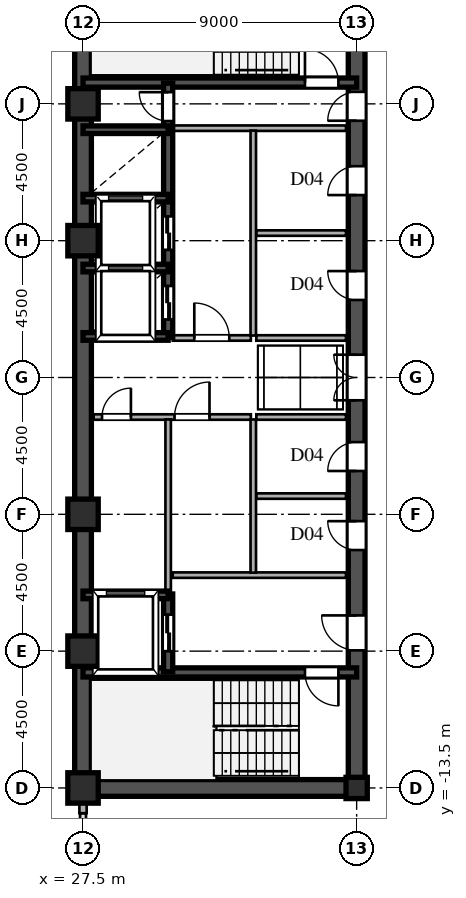
"""IFC4 building model, lengths in metres.
Left out: names, types, materials, properties, quantities, classifications, styles, units other than length and angle.
Written with IfcOpenShell. Run it as: python <this file> out.ifc"""

import sys

from ifc_helpers import new_model, si_unit, direction, frame, frame_2d, origin, origin_2d, place, context, subcontext, project, spatial, rectangle, hollow_rectangle, i_section, extrude, source, transform, mapped, element, fill, save


model = new_model("IFC4")
c1 = context("Model", 3, precision=1e-05, world=origin(), true_north=direction((0.0, 1.0)))
c2 = subcontext(c1, "Body", "Model", "MODEL_VIEW")
j1 = project(units=[si_unit("LENGTHUNIT", "METRE"), si_unit("PLANEANGLEUNIT", "RADIAN")], contexts=[c1])
p1 = place(None, origin())
s1 = spatial("IfcSite", under=j1, at=p1, CompositionType="ELEMENT")
p2 = place(p1, origin())
s2 = spatial("IfcBuilding", under=s1, at=p2, CompositionType="ELEMENT")
p3 = place(p2, frame((0.0, 0.0, 147.6)))
s3 = spatial("IfcBuildingStorey", under=s2, at=p3, CompositionType="ELEMENT", Elevation=147.6)
m1 = source(origin(), c2, "Body", "SweptSolid", [
    extrude(hollow_rectangle(XDim=1.0, YDim=1.0, WallThickness=0.042, at=origin_2d()), origin(), (0.0, 0.0, 1.0), 3.6),
])
for number, where, z_axis, x_axis in (
    (1, (27.5, -13.5, 0.0), (0.0, 0.0, 1.0), (1.0, 0.0, 0.0)),
    (2, (27.5, -9.0, 0.0), (0.0, 0.0, 1.0), (1.0, 0.0, 0.0)),
    (3, (27.5, -4.5, 0.0), (0.0, 0.0, 1.0), (1.0, 0.0, 0.0)),
    (4, (27.5, 4.5, 0.0), (0.0, 0.0, 1.0), (1.0, 0.0, 0.0)),
    (5, (27.5, 9.0, 0.0), (0.0, 0.0, 1.0), (1.0, 0.0, 0.0)),
):
    element("IfcColumn", number, at=place(p3, frame(where, z_axis=z_axis, x_axis=x_axis)), inside=s3, PredefinedType="COLUMN", context=c2, shape_type="MappedRepresentation", body=[
        mapped(m1, transform((0.0, 0.0, 0.0), scale=1.0)),
    ])
m2 = source(origin(), c2, "Body", "SweptSolid", [
    extrude(i_section(OverallWidth=0.7, OverallDepth=0.7, WebThickness=0.028, FlangeThickness=0.045, at=origin_2d()), origin(), (0.0, 0.0, 1.0), 3.6),
])
p4 = place(p3, frame((36.5, -13.5, 0.0), z_axis=(0.0, 0.0, 1.0), x_axis=(1.0, 0.0, 0.0)))
e6 = element("IfcColumn", 6, at=p4, inside=s3, PredefinedType="COLUMN", context=c2, shape_type="MappedRepresentation", body=[
    mapped(m2, transform((0.0, 0.0, 0.0), scale=1.0)),
])
p5 = place(p3, frame((27.5, -14.33, 0.0), z_axis=(0.0, 0.0, 1.0), x_axis=(0.0, 1.0, 0.0)))
e7 = element("IfcWall", 7, at=p5, inside=s3, PredefinedType="SOLIDWALL", context=c2, shape_type="SweptSolid", body=[
    extrude(rectangle(XDim=0.55, YDim=0.24, at=frame_2d((0.275, 0.0))), origin(), (0.0, 0.0, 1.0), 2.88),
])
for number, where, z_axis, x_axis in (
    (8, (27.5, -13.5, 0.0), (0.0, 0.0, 1.0), (0.0, 1.0, 0.0)),
    (9, (27.5, 1.3, 0.0), (0.0, 0.0, 1.0), (0.0, 1.0, 0.0)),
):
    element("IfcWall", number, at=place(p3, frame(where, z_axis=z_axis, x_axis=x_axis)), inside=s3, PredefinedType="SHEAR", context=c2, shape_type="SweptSolid", body=[
        extrude(rectangle(XDim=12.2, YDim=0.55, at=frame_2d((6.1, 0.0))), origin(), (0.0, 0.0, 1.0), 3.38),
    ])
p6 = place(p3, frame((27.5, -1.3, 0.0), z_axis=(0.0, 0.0, 1.0), x_axis=(0.0, 1.0, 0.0)))
e10 = element("IfcWall", 10, at=p6, inside=s3, PredefinedType="SHEAR", context=c2, shape_type="SweptSolid", body=[
    extrude(rectangle(XDim=2.6, YDim=0.55, at=frame_2d((1.3, 0.0))), origin(), (0.0, 0.0, 1.0), 3.38),
])
p7 = place(p3, frame((27.5, -13.5, 0.0), z_axis=(0.0, 0.0, 1.0), x_axis=(1.0, 0.0, 0.0)))
e11 = element("IfcWall", 11, at=p7, inside=s3, PredefinedType="SHEAR", context=c2, shape_type="SweptSolid", body=[
    extrude(rectangle(XDim=9.0, YDim=0.55, at=frame_2d((4.5, 0.0))), origin(), (0.0, 0.0, 1.0), 3.38),
])
p8 = place(p3, frame((36.5, -13.65, 0.0), z_axis=(0.0, 0.0, 1.0), x_axis=(0.0, 1.0, 0.0)))
e12 = element("IfcWall", 12, at=p8, inside=s3, PredefinedType="SHEAR", context=c2, shape_type="SweptSolid", body=[
    extrude(rectangle(XDim=7.15, YDim=0.55, at=frame_2d((3.575, 0.0))), origin(), (0.0, 0.0, 1.0), 3.38),
])
p9 = place(p8, frame((4.675, 0.0, 0.0)))
e13 = element("IfcOpeningElement", 13, at=p9, cuts=e12, PredefinedType="OPENING", context=c2, shape_type="SweptSolid", body=[
    extrude(rectangle(XDim=1.15, YDim=2.2, at=frame_2d((0.575, 1.1))), frame((0.0, 0.285, 0.0), z_axis=(0.0, -1.0, 0.0), x_axis=(1.0, 0.0, 0.0)), (0.0, 0.0, 1.0), 0.57),
])
p10 = place(p3, frame((36.5, -1.3, 0.0), z_axis=(0.0, 0.0, 1.0), x_axis=(0.0, 1.0, 0.0)))
e14 = element("IfcWall", 14, at=p10, inside=s3, PredefinedType="SHEAR", context=c2, shape_type="SweptSolid", body=[
    extrude(rectangle(XDim=2.6, YDim=0.55, at=frame_2d((1.3, 0.0))), origin(), (0.0, 0.0, 1.0), 3.38),
])
p11 = place(p10, frame((0.55, 0.0, 0.0)))
e15 = element("IfcOpeningElement", 15, at=p11, cuts=e14, PredefinedType="OPENING", context=c2, shape_type="SweptSolid", body=[
    extrude(rectangle(XDim=1.5, YDim=2.3, at=frame_2d((0.75, 1.15))), frame((0.0, 0.285, 0.0), z_axis=(0.0, -1.0, 0.0), x_axis=(1.0, 0.0, 0.0)), (0.0, 0.0, 1.0), 0.57),
])
p12 = place(p3, frame((36.5, 8.2, 0.0), z_axis=(0.0, 0.0, 1.0), x_axis=(0.0, 1.0, 0.0)))
e16 = element("IfcWall", 16, at=p12, inside=s3, PredefinedType="SHEAR", context=c2, shape_type="SweptSolid", body=[
    extrude(rectangle(XDim=5.45, YDim=0.55, at=frame_2d((2.725, 0.0))), origin(), (0.0, 0.0, 1.0), 3.38),
])
p13 = place(p12, frame((0.245, 0.0, 0.0)))
e17 = element("IfcOpeningElement", 17, at=p13, cuts=e16, PredefinedType="OPENING", context=c2, shape_type="SweptSolid", body=[
    extrude(rectangle(XDim=0.95, YDim=2.15, at=frame_2d((0.475, 1.075))), frame((0.0, 0.285, 0.0), z_axis=(0.0, -1.0, 0.0), x_axis=(1.0, 0.0, 0.0)), (0.0, 0.0, 1.0), 0.57),
])
p14 = place(p3, frame((36.5, -6.5, 0.0), z_axis=(0.0, 0.0, 1.0), x_axis=(0.0, 1.0, 0.0)))
e18 = element("IfcWall", 18, at=p14, inside=s3, PredefinedType="SHEAR", context=c2, shape_type="SweptSolid", body=[
    extrude(rectangle(XDim=2.6, YDim=0.55, at=frame_2d((1.3, 0.0))), origin(), (0.0, 0.0, 1.0), 3.38),
])
p15 = place(p14, frame((0.825, 0.0, 0.0)))
e19 = element("IfcOpeningElement", 19, at=p15, cuts=e18, PredefinedType="OPENING", context=c2, shape_type="SweptSolid", body=[
    extrude(rectangle(XDim=0.95, YDim=2.15, at=frame_2d((0.475, 1.075))), frame((0.0, 0.285, 0.0), z_axis=(0.0, -1.0, 0.0), x_axis=(1.0, 0.0, 0.0)), (0.0, 0.0, 1.0), 0.57),
])
p16 = place(p3, frame((36.5, -3.9, 0.0), z_axis=(0.0, 0.0, 1.0), x_axis=(0.0, 1.0, 0.0)))
e20 = element("IfcWall", 20, at=p16, inside=s3, PredefinedType="SHEAR", context=c2, shape_type="SweptSolid", body=[
    extrude(rectangle(XDim=2.6, YDim=0.55, at=frame_2d((1.3, 0.0))), origin(), (0.0, 0.0, 1.0), 3.38),
])
p17 = place(p16, frame((0.825, 0.0, 0.0)))
e21 = element("IfcOpeningElement", 21, at=p17, cuts=e20, PredefinedType="OPENING", context=c2, shape_type="SweptSolid", body=[
    extrude(rectangle(XDim=0.95, YDim=2.15, at=frame_2d((0.475, 1.075))), frame((0.0, 0.285, 0.0), z_axis=(0.0, -1.0, 0.0), x_axis=(1.0, 0.0, 0.0)), (0.0, 0.0, 1.0), 0.57),
])
p18 = place(p3, frame((36.5, 1.3, 0.0), z_axis=(0.0, 0.0, 1.0), x_axis=(0.0, 1.0, 0.0)))
e22 = element("IfcWall", 22, at=p18, inside=s3, PredefinedType="SHEAR", context=c2, shape_type="SweptSolid", body=[
    extrude(rectangle(XDim=3.45, YDim=0.55, at=frame_2d((1.725, 0.0))), origin(), (0.0, 0.0, 1.0), 3.38),
])
p19 = place(p18, frame((1.25, 0.0, 0.0)))
e23 = element("IfcOpeningElement", 23, at=p19, cuts=e22, PredefinedType="OPENING", context=c2, shape_type="SweptSolid", body=[
    extrude(rectangle(XDim=0.95, YDim=2.15, at=frame_2d((0.475, 1.075))), frame((0.0, 0.285, 0.0), z_axis=(0.0, -1.0, 0.0), x_axis=(1.0, 0.0, 0.0)), (0.0, 0.0, 1.0), 0.57),
])
p20 = place(p3, frame((36.5, 4.75, 0.0), z_axis=(0.0, 0.0, 1.0), x_axis=(0.0, 1.0, 0.0)))
e24 = element("IfcWall", 24, at=p20, inside=s3, PredefinedType="SHEAR", context=c2, shape_type="SweptSolid", body=[
    extrude(rectangle(XDim=3.45, YDim=0.55, at=frame_2d((1.725, 0.0))), origin(), (0.0, 0.0, 1.0), 3.38),
])
p21 = place(p20, frame((1.25, 0.0, 0.0)))
e25 = element("IfcOpeningElement", 25, at=p21, cuts=e24, PredefinedType="OPENING", context=c2, shape_type="SweptSolid", body=[
    extrude(rectangle(XDim=0.95, YDim=2.15, at=frame_2d((0.475, 1.075))), frame((0.0, 0.285, 0.0), z_axis=(0.0, -1.0, 0.0), x_axis=(1.0, 0.0, 0.0)), (0.0, 0.0, 1.0), 0.57),
])
p22 = place(p3, frame((27.5, -9.7, 0.0), z_axis=(0.0, 0.0, 1.0), x_axis=(1.0, 0.0, 0.0)))
e26 = element("IfcWall", 26, at=p22, inside=s3, PredefinedType="SHEAR", context=c2, shape_type="SweptSolid", body=[
    extrude(rectangle(XDim=9.0, YDim=0.3, at=frame_2d((4.5, 0.0))), origin(), (0.0, 0.0, 1.0), 3.38),
])
p23 = place(p22, frame((7.3, 0.0, 0.0)))
e27 = element("IfcOpeningElement", 27, at=p23, cuts=e26, PredefinedType="OPENING", context=c2, shape_type="SweptSolid", body=[
    extrude(rectangle(XDim=1.1, YDim=2.2, at=frame_2d((0.55, 1.1))), frame((0.0, 0.16, 0.0), z_axis=(0.0, -1.0, 0.0), x_axis=(1.0, 0.0, 0.0)), (0.0, 0.0, 1.0), 0.32),
])
p24 = place(p3, frame((27.5, 9.7, 0.0), z_axis=(0.0, 0.0, 1.0), x_axis=(1.0, 0.0, 0.0)))
e28 = element("IfcWall", 28, at=p24, inside=s3, PredefinedType="SHEAR", context=c2, shape_type="SweptSolid", body=[
    extrude(rectangle(XDim=9.0, YDim=0.3, at=frame_2d((4.5, 0.0))), origin(), (0.0, 0.0, 1.0), 3.38),
])
p25 = place(p24, frame((7.3, 0.0, 0.0)))
e29 = element("IfcOpeningElement", 29, at=p25, cuts=e28, PredefinedType="OPENING", context=c2, shape_type="SweptSolid", body=[
    extrude(rectangle(XDim=1.1, YDim=2.2, at=frame_2d((0.55, 1.1))), frame((0.0, 0.16, 0.0), z_axis=(0.0, -1.0, 0.0), x_axis=(1.0, 0.0, 0.0)), (0.0, 0.0, 1.0), 0.32),
])
for number, where, z_axis, x_axis in (
    (30, (27.5, -7.15, 0.0), (0.0, 0.0, 1.0), (1.0, 0.0, 0.0)),
    (31, (27.5, 1.35, 0.0), (0.0, 0.0, 1.0), (1.0, 0.0, 0.0)),
    (32, (27.5, 3.6, 0.0), (0.0, 0.0, 1.0), (1.0, 0.0, 0.0)),
    (33, (27.5, 5.9, 0.0), (0.0, 0.0, 1.0), (1.0, 0.0, 0.0)),
    (34, (27.5, 8.15, 0.0), (0.0, 0.0, 1.0), (1.0, 0.0, 0.0)),
):
    element("IfcWall", number, at=place(p3, frame(where, z_axis=z_axis, x_axis=x_axis)), inside=s3, PredefinedType="SHEAR", context=c2, shape_type="SweptSolid", body=[
        extrude(rectangle(XDim=2.8, YDim=0.25, at=frame_2d((1.4, 0.0))), origin(), (0.0, 0.0, 1.0), 3.38),
    ])
p26 = place(p3, frame((30.3, -9.68, 0.0), z_axis=(0.0, 0.0, 1.0), x_axis=(0.0, 1.0, 0.0)))
e35 = element("IfcWall", 35, at=p26, inside=s3, PredefinedType="SHEAR", context=c2, shape_type="SweptSolid", body=[
    extrude(rectangle(XDim=2.56, YDim=0.3, at=frame_2d((1.28, 0.0))), origin(), (0.0, 0.0, 1.0), 3.38),
])
p27 = place(p26, frame((0.68, 0.0, 0.0)))
e36 = element("IfcOpeningElement", 36, at=p27, cuts=e35, PredefinedType="OPENING", context=c2, shape_type="SweptSolid", body=[
    extrude(rectangle(XDim=1.2, YDim=2.25, at=frame_2d((0.6, 1.125))), frame((0.0, 0.16, 0.0), z_axis=(0.0, -1.0, 0.0), x_axis=(1.0, 0.0, 0.0)), (0.0, 0.0, 1.0), 0.32),
])
p28 = place(p3, frame((30.3, 1.32, 0.0), z_axis=(0.0, 0.0, 1.0), x_axis=(0.0, 1.0, 0.0)))
e37 = element("IfcWall", 37, at=p28, inside=s3, PredefinedType="SHEAR", context=c2, shape_type="SweptSolid", body=[
    extrude(rectangle(XDim=2.28, YDim=0.3, at=frame_2d((1.14, 0.0))), origin(), (0.0, 0.0, 1.0), 3.38),
])
p29 = place(p28, frame((0.59, 0.0, 0.0)))
e38 = element("IfcOpeningElement", 38, at=p29, cuts=e37, PredefinedType="OPENING", context=c2, shape_type="SweptSolid", body=[
    extrude(rectangle(XDim=1.1, YDim=2.2, at=frame_2d((0.55, 1.1))), frame((0.0, 0.16, 0.0), z_axis=(0.0, -1.0, 0.0), x_axis=(1.0, 0.0, 0.0)), (0.0, 0.0, 1.0), 0.32),
])
p30 = place(p3, frame((30.3, 3.6, 0.0), z_axis=(0.0, 0.0, 1.0), x_axis=(0.0, 1.0, 0.0)))
e39 = element("IfcWall", 39, at=p30, inside=s3, PredefinedType="SHEAR", context=c2, shape_type="SweptSolid", body=[
    extrude(rectangle(XDim=2.3, YDim=0.3, at=frame_2d((1.15, 0.0))), origin(), (0.0, 0.0, 1.0), 3.38),
])
p31 = place(p30, frame((0.6, 0.0, 0.0)))
e40 = element("IfcOpeningElement", 40, at=p31, cuts=e39, PredefinedType="OPENING", context=c2, shape_type="SweptSolid", body=[
    extrude(rectangle(XDim=1.1, YDim=2.2, at=frame_2d((0.55, 1.1))), frame((0.0, 0.16, 0.0), z_axis=(0.0, -1.0, 0.0), x_axis=(1.0, 0.0, 0.0)), (0.0, 0.0, 1.0), 0.32),
])
p32 = place(p3, frame((30.3, 5.9, 0.0), z_axis=(0.0, 0.0, 1.0), x_axis=(0.0, 1.0, 0.0)))
e41 = element("IfcWall", 41, at=p32, inside=s3, PredefinedType="SHEAR", context=c2, shape_type="SweptSolid", body=[
    extrude(rectangle(XDim=2.25, YDim=0.3, at=frame_2d((1.125, 0.0))), origin(), (0.0, 0.0, 1.0), 3.38),
])
p33 = place(p3, frame((30.3, 8.15, 0.0), z_axis=(0.0, 0.0, 1.0), x_axis=(0.0, 1.0, 0.0)))
e42 = element("IfcWall", 42, at=p33, inside=s3, PredefinedType="SHEAR", context=c2, shape_type="SweptSolid", body=[
    extrude(rectangle(XDim=1.53, YDim=0.3, at=frame_2d((0.765, 0.0))), origin(), (0.0, 0.0, 1.0), 3.38),
])
p34 = place(p33, frame((0.285, 0.0, 0.0)))
e43 = element("IfcOpeningElement", 43, at=p34, cuts=e42, PredefinedType="OPENING", context=c2, shape_type="SweptSolid", body=[
    extrude(rectangle(XDim=0.95, YDim=2.15, at=frame_2d((0.475, 1.075))), frame((0.0, 0.16, 0.0), z_axis=(0.0, -1.0, 0.0), x_axis=(1.0, 0.0, 0.0)), (0.0, 0.0, 1.0), 0.32),
])
for number, where, z_axis, x_axis in (
    (44, (30.45, -6.5, 0.0), (0.0, 0.0, 1.0), (1.0, 0.0, 0.0)),
    (45, (30.45, 8.2, 0.0), (0.0, 0.0, 1.0), (1.0, 0.0, 0.0)),
):
    element("IfcWall", number, at=place(p3, frame(where, z_axis=z_axis, x_axis=x_axis)), inside=s3, PredefinedType="PARTITIONING", context=c2, shape_type="SweptSolid", body=[
        extrude(rectangle(XDim=5.7, YDim=0.18, at=frame_2d((2.85, 0.0))), origin(), (0.0, 0.0, 1.0), 3.38),
    ])
p35 = place(p3, frame((33.1, -6.42, 0.0), z_axis=(0.0, 0.0, 1.0), x_axis=(0.0, 1.0, 0.0)))
e46 = element("IfcWall", 46, at=p35, inside=s3, PredefinedType="PARTITIONING", context=c2, shape_type="SweptSolid", body=[
    extrude(rectangle(XDim=5.04, YDim=0.18, at=frame_2d((2.52, 0.0))), origin(), (0.0, 0.0, 1.0), 3.38),
])
p36 = place(p3, frame((33.1, 1.38, 0.0), z_axis=(0.0, 0.0, 1.0), x_axis=(0.0, 1.0, 0.0)))
e47 = element("IfcWall", 47, at=p36, inside=s3, PredefinedType="PARTITIONING", context=c2, shape_type="SweptSolid", body=[
    extrude(rectangle(XDim=6.74, YDim=0.18, at=frame_2d((3.37, 0.0))), origin(), (0.0, 0.0, 1.0), 3.38),
])
p37 = place(p3, frame((27.85, -1.3, 0.0), z_axis=(0.0, 0.0, 1.0), x_axis=(1.0, 0.0, 0.0)))
e48 = element("IfcWall", 48, at=p37, inside=s3, PredefinedType="PARTITIONING", context=c2, shape_type="SweptSolid", body=[
    extrude(rectangle(XDim=2.45, YDim=0.18, at=frame_2d((1.225, 0.0))), origin(), (0.0, 0.0, 1.0), 3.38),
])
p38 = place(p37, frame((0.275, 0.0, 0.0)))
e49 = element("IfcOpeningElement", 49, at=p38, cuts=e48, PredefinedType="OPENING", context=c2, shape_type="SweptSolid", body=[
    extrude(rectangle(XDim=0.95, YDim=2.15, at=frame_2d((0.475, 1.075))), frame((0.0, 0.1, 0.0), z_axis=(0.0, -1.0, 0.0), x_axis=(1.0, 0.0, 0.0)), (0.0, 0.0, 1.0), 0.2),
])
p39 = place(p3, frame((30.3, -1.3, 0.0), z_axis=(0.0, 0.0, 1.0), x_axis=(1.0, 0.0, 0.0)))
e50 = element("IfcWall", 50, at=p39, inside=s3, PredefinedType="PARTITIONING", context=c2, shape_type="SweptSolid", body=[
    extrude(rectangle(XDim=2.72, YDim=0.18, at=frame_2d((1.36, 0.0))), origin(), (0.0, 0.0, 1.0), 3.38),
])
p40 = place(p39, frame((0.21, 0.0, 0.0)))
e51 = element("IfcOpeningElement", 51, at=p40, cuts=e50, PredefinedType="OPENING", context=c2, shape_type="SweptSolid", body=[
    extrude(rectangle(XDim=1.15, YDim=2.2, at=frame_2d((0.575, 1.1))), frame((0.0, 0.1, 0.0), z_axis=(0.0, -1.0, 0.0), x_axis=(1.0, 0.0, 0.0)), (0.0, 0.0, 1.0), 0.2),
])
p41 = place(p3, frame((30.3, -7.12, 0.0), z_axis=(0.0, 0.0, 1.0), x_axis=(0.0, 1.0, 0.0)))
e52 = element("IfcWall", 52, at=p41, inside=s3, PredefinedType="PARTITIONING", context=c2, shape_type="SweptSolid", body=[
    extrude(rectangle(XDim=5.74, YDim=0.18, at=frame_2d((2.87, 0.0))), origin(), (0.0, 0.0, 1.0), 3.38),
])
p42 = place(p3, frame((30.45, 1.3, 0.0), z_axis=(0.0, 0.0, 1.0), x_axis=(1.0, 0.0, 0.0)))
e53 = element("IfcWall", 53, at=p42, inside=s3, PredefinedType="PARTITIONING", context=c2, shape_type="SweptSolid", body=[
    extrude(rectangle(XDim=2.57, YDim=0.18, at=frame_2d((1.285, 0.0))), origin(), (0.0, 0.0, 1.0), 3.38),
])
p43 = place(p42, frame((0.71, 0.0, 0.0)))
e54 = element("IfcOpeningElement", 54, at=p43, cuts=e53, PredefinedType="OPENING", context=c2, shape_type="SweptSolid", body=[
    extrude(rectangle(XDim=1.15, YDim=2.2, at=frame_2d((0.575, 1.1))), frame((0.0, 0.1, 0.0), z_axis=(0.0, -1.0, 0.0), x_axis=(1.0, 0.0, 0.0)), (0.0, 0.0, 1.0), 0.2),
])
for number, where, z_axis, x_axis in (
    (55, (33.2, -1.3, 0.0), (0.0, 0.0, 1.0), (1.0, 0.0, 0.0)),
    (56, (33.2, 1.3, 0.0), (0.0, 0.0, 1.0), (1.0, 0.0, 0.0)),
    (57, (33.2, -3.9, 0.0), (0.0, 0.0, 1.0), (1.0, 0.0, 0.0)),
    (58, (33.2, 4.75, 0.0), (0.0, 0.0, 1.0), (1.0, 0.0, 0.0)),
):
    element("IfcWall", number, at=place(p3, frame(where, z_axis=z_axis, x_axis=x_axis)), inside=s3, PredefinedType="PARTITIONING", context=c2, shape_type="SweptSolid", body=[
        extrude(rectangle(XDim=2.95, YDim=0.18, at=frame_2d((1.475, 0.0))), origin(), (0.0, 0.0, 1.0), 3.38),
    ])
m3 = source(origin(), c2, "Body", "SweptSolid", [
    extrude(rectangle(XDim=1.15, YDim=2.2, at=frame_2d((0.575, 1.1))), frame((0.0, 0.025, 0.0), z_axis=(0.0, -1.0, 0.0), x_axis=(1.0, 0.0, 0.0)), (0.0, 0.0, 1.0), 0.05),
])
p44 = place(p9, origin())
e59 = element("IfcDoor", 59, at=p44, inside=s3, OperationType="SINGLE_SWING_RIGHT", PredefinedType="DOOR", context=c2, shape_type="MappedRepresentation", body=[
    mapped(m3, transform((0.0, 0.0, 0.0), scale=1.0)),
])
fill(e13, e59)
m4 = source(origin(), c2, "Body", "SweptSolid", [
    extrude(rectangle(XDim=1.5, YDim=2.3, at=frame_2d((0.75, 1.15))), frame((0.0, 0.025, 0.0), z_axis=(0.0, -1.0, 0.0), x_axis=(1.0, 0.0, 0.0)), (0.0, 0.0, 1.0), 0.05),
])
p45 = place(p11, origin())
e60 = element("IfcDoor", 60, at=p45, inside=s3, OperationType="DOUBLE_SWING_LEFT", PredefinedType="DOOR", context=c2, shape_type="MappedRepresentation", body=[
    mapped(m4, transform((0.0, 0.0, 0.0), scale=1.0)),
])
fill(e15, e60)
m5 = source(origin(), c2, "Body", "SweptSolid", [
    extrude(rectangle(XDim=0.95, YDim=2.15, at=frame_2d((0.475, 1.075))), frame((0.0, 0.025, 0.0), z_axis=(0.0, -1.0, 0.0), x_axis=(1.0, 0.0, 0.0)), (0.0, 0.0, 1.0), 0.05),
])
p46 = place(p13, origin())
e61 = element("IfcDoor", 61, at=p46, inside=s3, OperationType="SINGLE_SWING_LEFT", PredefinedType="DOOR", context=c2, shape_type="MappedRepresentation", body=[
    mapped(m5, transform((0.0, 0.0, 0.0), scale=1.0)),
])
fill(e17, e61)
p47 = place(p15, origin())
e62 = element("IfcDoor", 62, at=p47, inside=s3, OperationType="SINGLE_SWING_RIGHT", PredefinedType="DOOR", context=c2, shape_type="MappedRepresentation", body=[
    mapped(m5, transform((0.0, 0.0, 0.0), scale=1.0)),
])
fill(e19, e62)
p48 = place(p17, origin())
e63 = element("IfcDoor", 63, at=p48, inside=s3, OperationType="SINGLE_SWING_LEFT", PredefinedType="DOOR", context=c2, shape_type="MappedRepresentation", body=[
    mapped(m5, transform((0.0, 0.0, 0.0), scale=1.0)),
])
fill(e21, e63)
p49 = place(p19, origin())
e64 = element("IfcDoor", 64, at=p49, inside=s3, OperationType="SINGLE_SWING_RIGHT", PredefinedType="DOOR", context=c2, shape_type="MappedRepresentation", body=[
    mapped(m5, transform((0.0, 0.0, 0.0), scale=1.0)),
])
fill(e23, e64)
p50 = place(p21, origin())
e65 = element("IfcDoor", 65, at=p50, inside=s3, OperationType="SINGLE_SWING_LEFT", PredefinedType="DOOR", context=c2, shape_type="MappedRepresentation", body=[
    mapped(m5, transform((0.0, 0.0, 0.0), scale=1.0)),
])
fill(e25, e65)
m6 = source(origin(), c2, "Body", "SweptSolid", [
    extrude(rectangle(XDim=1.1, YDim=2.2, at=frame_2d((0.55, 1.1))), frame((0.0, 0.025, 0.0), z_axis=(0.0, -1.0, 0.0), x_axis=(1.0, 0.0, 0.0)), (0.0, 0.0, 1.0), 0.05),
])
p51 = place(p23, frame((1.1, 0.0, 0.0), z_axis=(0.0, 0.0, 1.0), x_axis=(-1.0, 0.0, 0.0)))
e66 = element("IfcDoor", 66, at=p51, inside=s3, OperationType="SINGLE_SWING_RIGHT", PredefinedType="DOOR", context=c2, shape_type="MappedRepresentation", body=[
    mapped(m6, transform((0.0, 0.0, 0.0), scale=1.0)),
])
fill(e27, e66)
p52 = place(p25, origin())
e67 = element("IfcDoor", 67, at=p52, inside=s3, OperationType="SINGLE_SWING_LEFT", PredefinedType="DOOR", context=c2, shape_type="MappedRepresentation", body=[
    mapped(m6, transform((0.0, 0.0, 0.0), scale=1.0)),
])
fill(e29, e67)
m7 = source(origin(), c2, "Body", "SweptSolid", [
    extrude(rectangle(XDim=1.2, YDim=2.25, at=frame_2d((0.6, 1.125))), frame((0.0, 0.025, 0.0), z_axis=(0.0, -1.0, 0.0), x_axis=(1.0, 0.0, 0.0)), (0.0, 0.0, 1.0), 0.05),
])
p53 = place(p27, origin())
e68 = element("IfcDoor", 68, at=p53, inside=s3, OperationType="DOUBLE_DOOR_SLIDING", PredefinedType="DOOR", context=c2, shape_type="MappedRepresentation", body=[
    mapped(m7, transform((0.0, 0.0, 0.0), scale=1.0)),
])
fill(e36, e68)
m8 = source(origin(), c2, "Body", "SweptSolid", [
    extrude(rectangle(XDim=1.1, YDim=2.2, at=frame_2d((0.55, 1.1))), frame((0.0, 0.025, 0.0), z_axis=(0.0, -1.0, 0.0), x_axis=(1.0, 0.0, 0.0)), (0.0, 0.0, 1.0), 0.05),
])
p54 = place(p29, origin())
e69 = element("IfcDoor", 69, at=p54, inside=s3, OperationType="DOUBLE_DOOR_SLIDING", PredefinedType="DOOR", context=c2, shape_type="MappedRepresentation", body=[
    mapped(m8, transform((0.0, 0.0, 0.0), scale=1.0)),
])
fill(e38, e69)
p55 = place(p31, origin())
e70 = element("IfcDoor", 70, at=p55, inside=s3, OperationType="DOUBLE_DOOR_SLIDING", PredefinedType="DOOR", context=c2, shape_type="MappedRepresentation", body=[
    mapped(m8, transform((0.0, 0.0, 0.0), scale=1.0)),
])
fill(e40, e70)
p56 = place(p34, origin())
e71 = element("IfcDoor", 71, at=p56, inside=s3, OperationType="SINGLE_SWING_RIGHT", PredefinedType="DOOR", context=c2, shape_type="MappedRepresentation", body=[
    mapped(m5, transform((0.0, 0.0, 0.0), scale=1.0)),
])
fill(e43, e71)
p57 = place(p38, origin())
e72 = element("IfcDoor", 72, at=p57, inside=s3, OperationType="SINGLE_SWING_RIGHT", PredefinedType="DOOR", context=c2, shape_type="MappedRepresentation", body=[
    mapped(m5, transform((0.0, 0.0, 0.0), scale=1.0)),
])
fill(e49, e72)
p58 = place(p40, origin())
e73 = element("IfcDoor", 73, at=p58, inside=s3, OperationType="SINGLE_SWING_RIGHT", PredefinedType="DOOR", context=c2, shape_type="MappedRepresentation", body=[
    mapped(m3, transform((0.0, 0.0, 0.0), scale=1.0)),
])
fill(e51, e73)
p59 = place(p43, origin())
e74 = element("IfcDoor", 74, at=p59, inside=s3, OperationType="SINGLE_SWING_LEFT", PredefinedType="DOOR", context=c2, shape_type="MappedRepresentation", body=[
    mapped(m3, transform((0.0, 0.0, 0.0), scale=1.0)),
])
fill(e54, e74)
save(model, sys.argv[1])
